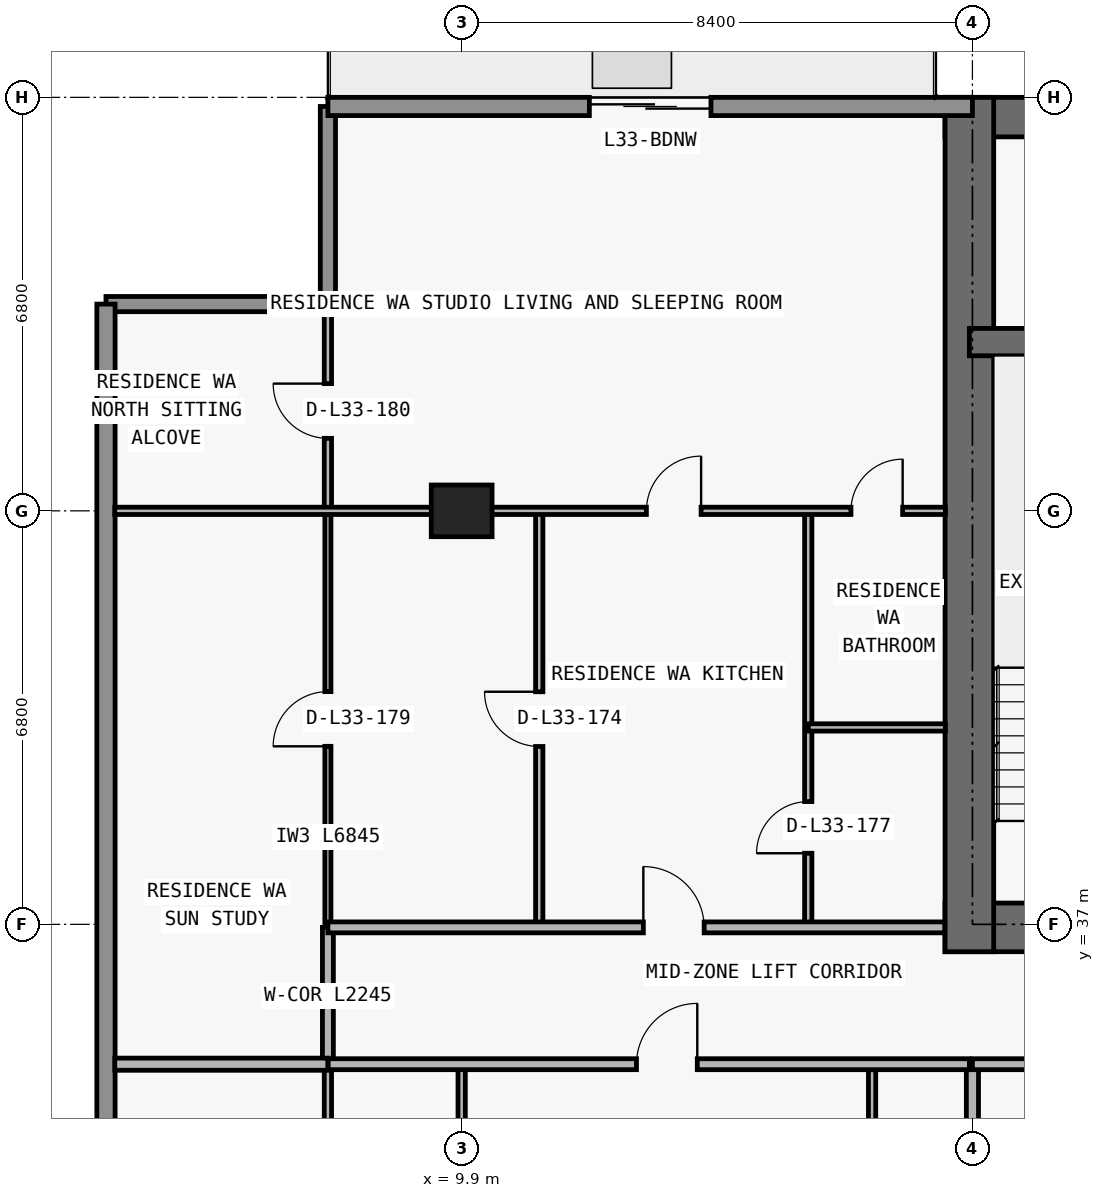
"""IFC4 building model, lengths in metres.
Left out: names, types, materials, properties, quantities, classifications, styles, units other than length and angle.
Written with IfcOpenShell. Run it as: python <this file> out.ifc"""

import sys

from ifc_helpers import new_model, si_unit, direction, frame, frame_2d, origin, origin_2d, place, context, subcontext, project, spatial, rectangle, extrude, element, fill, save


model = new_model("IFC4")
c1 = context("Model", 3, precision=1e-05, world=origin(), true_north=direction((0.0, 1.0)))
c2 = subcontext(c1, "Body", "Model", "MODEL_VIEW")
j1 = project(units=[si_unit("LENGTHUNIT", "METRE"), si_unit("PLANEANGLEUNIT", "RADIAN")], contexts=[c1])
p1 = place(None, origin())
s1 = spatial("IfcSite", under=j1, at=p1, CompositionType="ELEMENT")
p2 = place(p1, origin())
s2 = spatial("IfcBuilding", under=s1, at=p2, CompositionType="ELEMENT")
p3 = place(p2, frame((0.0, 0.0, 122.4)))
s3 = spatial("IfcBuildingStorey", under=s2, at=p3, CompositionType="ELEMENT", Elevation=122.4)
p4 = place(p3, frame((9.9, 43.8, 0.0), z_axis=(0.0, 0.0, 1.0), x_axis=(1.0, 0.0, 0.0)))
e1 = element("IfcColumn", 1, at=p4, inside=s3, PredefinedType="COLUMN", context=c2, shape_type="SweptSolid", body=[
    extrude(rectangle(XDim=1.0, YDim=0.85, at=origin_2d()), origin(), (0.0, 0.0, 1.0), 3.05),
])
p5 = place(p3, frame((17.85, 36.95, 0.0), z_axis=(0.0, 0.0, 1.0), x_axis=(1.0, 0.0, 0.0)))
e2 = element("IfcWall", 2, at=p5, inside=s3, PredefinedType="SHEAR", context=c2, shape_type="SweptSolid", body=[
    extrude(rectangle(XDim=42.1, YDim=0.8, at=frame_2d((21.05, 0.0))), origin(), (0.0, 0.0, 1.0), 3.05),
])
p6 = place(p5, frame((14.45, 0.0, 0.0)))
e3 = element("IfcOpeningElement", 3, at=p6, cuts=e2, PredefinedType="OPENING", context=c2, shape_type="SweptSolid", body=[
    extrude(rectangle(XDim=1.1, YDim=2.15, at=frame_2d((0.55, 1.075))), frame((0.0, 0.41, 0.0), z_axis=(0.0, -1.0, 0.0), x_axis=(1.0, 0.0, 0.0)), (0.0, 0.0, 1.0), 0.82),
])
p7 = place(p5, frame((6.3, 0.0, 0.0)))
e4 = element("IfcOpeningElement", 4, at=p7, cuts=e2, PredefinedType="OPENING", context=c2, shape_type="SweptSolid", body=[
    extrude(rectangle(XDim=1.05, YDim=2.15, at=frame_2d((0.525, 1.075))), frame((0.0, 0.41, 0.0), z_axis=(0.0, -1.0, 0.0), x_axis=(1.0, 0.0, 0.0)), (0.0, 0.0, 1.0), 0.82),
])
p8 = place(p5, frame((34.8, 0.0, 0.0)))
e5 = element("IfcOpeningElement", 5, at=p8, cuts=e2, PredefinedType="OPENING", context=c2, shape_type="SweptSolid", body=[
    extrude(rectangle(XDim=1.05, YDim=2.15, at=frame_2d((0.525, 1.075))), frame((0.0, 0.41, 0.0), z_axis=(0.0, -1.0, 0.0), x_axis=(1.0, 0.0, 0.0)), (0.0, 0.0, 1.0), 0.82),
])
p9 = place(p5, frame((10.913, 0.0, 0.0)))
e6 = element("IfcOpeningElement", 6, at=p9, cuts=e2, PredefinedType="OPENING", context=c2, shape_type="SweptSolid", body=[
    extrude(rectangle(XDim=1.05, YDim=2.15, at=frame_2d((0.525, 1.075))), frame((0.0, 0.41, 0.0), z_axis=(0.0, -1.0, 0.0), x_axis=(1.0, 0.0, 0.0)), (0.0, 0.0, 1.0), 0.82),
])
p10 = place(p5, frame((24.15, 0.0, 0.0)))
e7 = element("IfcOpeningElement", 7, at=p10, cuts=e2, PredefinedType="OPENING", context=c2, shape_type="SweptSolid", body=[
    extrude(rectangle(XDim=1.05, YDim=2.15, at=frame_2d((0.525, 1.075))), frame((0.0, 0.41, 0.0), z_axis=(0.0, -1.0, 0.0), x_axis=(1.0, 0.0, 0.0)), (0.0, 0.0, 1.0), 0.82),
])
p11 = place(p3, frame((17.85, 50.275, 0.0), z_axis=(0.0, 0.0, 1.0), x_axis=(1.0, 0.0, 0.0)))
e8 = element("IfcWall", 8, at=p11, inside=s3, PredefinedType="SHEAR", context=c2, shape_type="SweptSolid", body=[
    extrude(rectangle(XDim=42.1, YDim=0.65, at=frame_2d((21.05, 0.0))), origin(), (0.0, 0.0, 1.0), 3.05),
])
p12 = place(p3, frame((18.25, 36.55, 0.0), z_axis=(0.0, 0.0, 1.0), x_axis=(0.0, 1.0, 0.0)))
e9 = element("IfcWall", 9, at=p12, inside=s3, PredefinedType="SHEAR", context=c2, shape_type="SweptSolid", body=[
    extrude(rectangle(XDim=14.05, YDim=0.8, at=frame_2d((7.025, 0.0))), origin(), (0.0, 0.0, 1.0), 3.05),
])
p13 = place(p3, frame((18.25, 46.575, 0.0), z_axis=(0.0, 0.0, 1.0), x_axis=(1.0, 0.0, 0.0)))
e10 = element("IfcWall", 10, at=p13, inside=s3, PredefinedType="SHEAR", context=c2, shape_type="SweptSolid", body=[
    extrude(rectangle(XDim=41.3, YDim=0.45, at=frame_2d((20.65, 0.0))), origin(), (0.0, 0.0, 1.0), 3.05),
])
p14 = place(p13, frame((7.65, 0.0, 0.0)))
e11 = element("IfcOpeningElement", 11, at=p14, cuts=e10, PredefinedType="OPENING", context=c2, shape_type="SweptSolid", body=[
    extrude(rectangle(XDim=1.0, YDim=2.2, at=frame_2d((0.5, 1.1))), frame((0.0, 0.235, 0.0), z_axis=(0.0, -1.0, 0.0), x_axis=(1.0, 0.0, 0.0)), (0.0, 0.0, 1.0), 0.47),
])
p15 = place(p13, frame((32.675, 0.0, 0.0)))
e12 = element("IfcOpeningElement", 12, at=p15, cuts=e10, PredefinedType="OPENING", context=c2, shape_type="SweptSolid", body=[
    extrude(rectangle(XDim=1.05, YDim=2.15, at=frame_2d((0.525, 1.075))), frame((0.0, 0.235, 0.0), z_axis=(0.0, -1.0, 0.0), x_axis=(1.0, 0.0, 0.0)), (0.0, 0.0, 1.0), 0.47),
])
p16 = place(p3, frame((4.05, 47.2, 0.0), z_axis=(0.0, 0.0, 1.0), x_axis=(1.0, 0.0, 0.0)))
e13 = element("IfcWall", 13, at=p16, inside=s3, PredefinedType="ELEMENTEDWALL", context=c2, shape_type="SweptSolid", body=[
    extrude(rectangle(XDim=3.65, YDim=0.25, at=frame_2d((1.825, 0.0))), origin(), (0.0, 0.0, 1.0), 3.05),
])
p17 = place(p3, frame((7.7, 47.2, 0.0), z_axis=(0.0, 0.0, 1.0), x_axis=(0.0, 1.0, 0.0)))
e14 = element("IfcWall", 14, at=p17, inside=s3, PredefinedType="ELEMENTEDWALL", context=c2, shape_type="SweptSolid", body=[
    extrude(rectangle(XDim=3.25, YDim=0.25, at=frame_2d((1.625, 0.0))), origin(), (0.0, 0.0, 1.0), 3.05),
])
p18 = place(p3, frame((4.05, 28.0, 0.0), z_axis=(0.0, 0.0, 1.0), x_axis=(0.0, 1.0, 0.0)))
e15 = element("IfcWall", 15, at=p18, inside=s3, PredefinedType="STANDARD", context=c2, shape_type="SweptSolid", body=[
    extrude(rectangle(XDim=19.2, YDim=0.3, at=frame_2d((9.6, 0.0))), origin(), (0.0, 0.0, 1.0), 3.05),
])
p19 = place(p3, frame((7.7, 50.45, 0.0), z_axis=(0.0, 0.0, 1.0), x_axis=(1.0, 0.0, 0.0)))
e16 = element("IfcWall", 16, at=p19, inside=s3, PredefinedType="STANDARD", context=c2, shape_type="SweptSolid", body=[
    extrude(rectangle(XDim=10.6, YDim=0.3, at=frame_2d((5.3, 0.0))), origin(), (0.0, 0.0, 1.0), 3.05),
])
p20 = place(p19, frame((4.3, 0.0, 0.0)))
e17 = element("IfcOpeningElement", 17, at=p20, cuts=e16, PredefinedType="OPENING", context=c2, shape_type="SweptSolid", body=[
    extrude(rectangle(XDim=2.0, YDim=2.3, at=frame_2d((1.0, 1.15))), frame((0.0, 0.16, 0.0), z_axis=(0.0, -1.0, 0.0), x_axis=(1.0, 0.0, 0.0)), (0.0, 0.0, 1.0), 0.32),
])
p21 = place(p3, frame((7.7, 26.64, 0.0), z_axis=(0.0, 0.0, 1.0), x_axis=(0.0, 1.0, 0.0)))
e18 = element("IfcWall", 18, at=p21, inside=s3, PredefinedType="PARTITIONING", context=c2, shape_type="SweptSolid", body=[
    extrude(rectangle(XDim=8.06, YDim=0.12, at=frame_2d((4.03, 0.0))), origin(), (0.0, 0.0, 1.0), 3.05),
])
p22 = place(p3, frame((7.7, 34.705, 0.0), z_axis=(0.0, 0.0, 1.0), x_axis=(0.0, 1.0, 0.0)))
e19 = element("IfcWall", 19, at=p22, inside=s3, PredefinedType="PARTITIONING", context=c2, shape_type="SweptSolid", body=[
    extrude(rectangle(XDim=2.245, YDim=0.18, at=frame_2d((1.123, 0.0))), origin(), (0.0, 0.0, 1.0), 3.05),
])
p23 = place(p3, frame((7.7, 36.955, 0.0), z_axis=(0.0, 0.0, 1.0), x_axis=(0.0, 1.0, 0.0)))
e20 = element("IfcWall", 20, at=p23, inside=s3, PredefinedType="MOVABLE", context=c2, shape_type="SweptSolid", body=[
    extrude(rectangle(XDim=6.845, YDim=0.1, at=frame_2d((3.422, 0.0))), origin(), (0.0, 0.0, 1.0), 3.05),
])
p24 = place(p23, frame((2.972, 0.0, 0.0)))
e21 = element("IfcOpeningElement", 21, at=p24, cuts=e20, PredefinedType="OPENING", context=c2, shape_type="SweptSolid", body=[
    extrude(rectangle(XDim=0.9, YDim=2.15, at=frame_2d((0.45, 1.075))), frame((0.0, 0.06, 0.0), z_axis=(0.0, -1.0, 0.0), x_axis=(1.0, 0.0, 0.0)), (0.0, 0.0, 1.0), 0.12),
])
p25 = place(p3, frame((7.7, 43.805, 0.0), z_axis=(0.0, 0.0, 1.0), x_axis=(0.0, 1.0, 0.0)))
e22 = element("IfcWall", 22, at=p25, inside=s3, PredefinedType="PARTITIONING", context=c2, shape_type="SweptSolid", body=[
    extrude(rectangle(XDim=3.275, YDim=0.12, at=frame_2d((1.638, 0.0))), origin(), (0.0, 0.0, 1.0), 3.05),
])
p26 = place(p25, frame((1.188, 0.0, 0.0)))
e23 = element("IfcOpeningElement", 23, at=p26, cuts=e22, PredefinedType="OPENING", context=c2, shape_type="SweptSolid", body=[
    extrude(rectangle(XDim=0.9, YDim=2.15, at=frame_2d((0.45, 1.075))), frame((0.0, 0.07, 0.0), z_axis=(0.0, -1.0, 0.0), x_axis=(1.0, 0.0, 0.0)), (0.0, 0.0, 1.0), 0.14),
])
p27 = place(p3, frame((9.9, 26.64, 0.0), z_axis=(0.0, 0.0, 1.0), x_axis=(0.0, 1.0, 0.0)))
e24 = element("IfcWall", 24, at=p27, inside=s3, PredefinedType="PARTITIONING", context=c2, shape_type="SweptSolid", body=[
    extrude(rectangle(XDim=8.06, YDim=0.12, at=frame_2d((4.03, 0.0))), origin(), (0.0, 0.0, 1.0), 2.174),
])
p28 = place(p3, frame((11.176, 36.95, 0.0), z_axis=(0.0, 0.0, 1.0), x_axis=(0.0, 1.0, 0.0)))
e25 = element("IfcWall", 25, at=p28, inside=s3, PredefinedType="PARTITIONING", context=c2, shape_type="SweptSolid", body=[
    extrude(rectangle(XDim=6.85, YDim=0.12, at=frame_2d((3.425, 0.0))), origin(), (0.0, 0.0, 1.0), 3.05),
])
p29 = place(p28, frame((2.975, 0.0, 0.0)))
e26 = element("IfcOpeningElement", 26, at=p29, cuts=e25, PredefinedType="OPENING", context=c2, shape_type="SweptSolid", body=[
    extrude(rectangle(XDim=0.9, YDim=2.15, at=frame_2d((0.45, 1.075))), frame((0.0, 0.07, 0.0), z_axis=(0.0, -1.0, 0.0), x_axis=(1.0, 0.0, 0.0)), (0.0, 0.0, 1.0), 0.14),
])
p30 = place(p3, frame((15.6, 36.95, 0.0), z_axis=(0.0, 0.0, 1.0), x_axis=(0.0, 1.0, 0.0)))
e27 = element("IfcWall", 27, at=p30, inside=s3, PredefinedType="PARTITIONING", context=c2, shape_type="SweptSolid", body=[
    extrude(rectangle(XDim=6.85, YDim=0.12, at=frame_2d((3.425, 0.0))), origin(), (0.0, 0.0, 1.0), 3.05),
])
p31 = place(p30, frame((1.219, 0.0, 0.0)))
e28 = element("IfcOpeningElement", 28, at=p31, cuts=e27, PredefinedType="OPENING", context=c2, shape_type="SweptSolid", body=[
    extrude(rectangle(XDim=0.85, YDim=2.1, at=frame_2d((0.425, 1.05))), frame((0.0, 0.07, 0.0), z_axis=(0.0, -1.0, 0.0), x_axis=(1.0, 0.0, 0.0)), (0.0, 0.0, 1.0), 0.14),
])
p32 = place(p3, frame((16.65, 26.64, 0.0), z_axis=(0.0, 0.0, 1.0), x_axis=(0.0, 1.0, 0.0)))
e29 = element("IfcWall", 29, at=p32, inside=s3, PredefinedType="PARTITIONING", context=c2, shape_type="SweptSolid", body=[
    extrude(rectangle(XDim=8.06, YDim=0.12, at=frame_2d((4.03, 0.0))), origin(), (0.0, 0.0, 1.0), 3.05),
])
p33 = place(p32, frame((3.755, 0.0, 0.0)))
e30 = element("IfcOpeningElement", 30, at=p33, cuts=e29, PredefinedType="OPENING", context=c2, shape_type="SweptSolid", body=[
    extrude(rectangle(XDim=0.85, YDim=2.1, at=frame_2d((0.425, 1.05))), frame((0.0, 0.07, 0.0), z_axis=(0.0, -1.0, 0.0), x_axis=(1.0, 0.0, 0.0)), (0.0, 0.0, 1.0), 0.14),
])
p34 = place(p3, frame((18.3, 26.64, 0.0), z_axis=(0.0, 0.0, 1.0), x_axis=(0.0, 1.0, 0.0)))
e31 = element("IfcWall", 31, at=p34, inside=s3, PredefinedType="PARTITIONING", context=c2, shape_type="SweptSolid", body=[
    extrude(rectangle(XDim=8.06, YDim=0.2, at=frame_2d((4.03, 0.0))), origin(), (0.0, 0.0, 1.0), 2.174),
])
p35 = place(p3, frame((4.195, 34.7, 0.0), z_axis=(0.0, 0.0, 1.0), x_axis=(1.0, 0.0, 0.0)))
e32 = element("IfcWall", 32, at=p35, inside=s3, PredefinedType="PARTITIONING", context=c2, shape_type="SweptSolid", body=[
    extrude(rectangle(XDim=3.505, YDim=0.2, at=frame_2d((1.752, 0.0))), origin(), (0.0, 0.0, 1.0), 3.05),
])
p36 = place(p3, frame((7.705, 34.7, 0.0), z_axis=(0.0, 0.0, 1.0), x_axis=(1.0, 0.0, 0.0)))
e33 = element("IfcWall", 33, at=p36, inside=s3, PredefinedType="PARTITIONING", context=c2, shape_type="SweptSolid", body=[
    extrude(rectangle(XDim=10.545, YDim=0.18, at=frame_2d((5.272, 0.0))), origin(), (0.0, 0.0, 1.0), 3.05),
])
p37 = place(p36, frame((5.07, 0.0, 0.0)))
e34 = element("IfcOpeningElement", 34, at=p37, cuts=e33, PredefinedType="OPENING", context=c2, shape_type="SweptSolid", body=[
    extrude(rectangle(XDim=1.0, YDim=2.2, at=frame_2d((0.5, 1.1))), frame((0.0, 0.1, 0.0), z_axis=(0.0, -1.0, 0.0), x_axis=(1.0, 0.0, 0.0)), (0.0, 0.0, 1.0), 0.2),
])
p38 = place(p3, frame((18.3, 34.7, 0.0), z_axis=(0.0, 0.0, 1.0), x_axis=(1.0, 0.0, 0.0)))
e35 = element("IfcWall", 35, at=p38, inside=s3, PredefinedType="PARTITIONING", context=c2, shape_type="SweptSolid", body=[
    extrude(rectangle(XDim=41.2, YDim=0.18, at=frame_2d((20.6, 0.0))), origin(), (0.0, 0.0, 1.0), 3.05),
])
p39 = place(p38, frame((2.875, 0.0, 0.0)))
e36 = element("IfcOpeningElement", 36, at=p39, cuts=e35, PredefinedType="OPENING", context=c2, shape_type="SweptSolid", body=[
    extrude(rectangle(XDim=1.0, YDim=2.2, at=frame_2d((0.5, 1.1))), frame((0.0, 0.1, 0.0), z_axis=(0.0, -1.0, 0.0), x_axis=(1.0, 0.0, 0.0)), (0.0, 0.0, 1.0), 0.2),
])
p40 = place(p38, frame((11.275, 0.0, 0.0)))
e37 = element("IfcOpeningElement", 37, at=p40, cuts=e35, PredefinedType="OPENING", context=c2, shape_type="SweptSolid", body=[
    extrude(rectangle(XDim=1.0, YDim=2.2, at=frame_2d((0.5, 1.1))), frame((0.0, 0.1, 0.0), z_axis=(0.0, -1.0, 0.0), x_axis=(1.0, 0.0, 0.0)), (0.0, 0.0, 1.0), 0.2),
])
p41 = place(p38, frame((19.275, 0.0, 0.0)))
e38 = element("IfcOpeningElement", 38, at=p41, cuts=e35, PredefinedType="OPENING", context=c2, shape_type="SweptSolid", body=[
    extrude(rectangle(XDim=1.0, YDim=2.2, at=frame_2d((0.5, 1.1))), frame((0.0, 0.1, 0.0), z_axis=(0.0, -1.0, 0.0), x_axis=(1.0, 0.0, 0.0)), (0.0, 0.0, 1.0), 0.2),
])
p42 = place(p38, frame((27.275, 0.0, 0.0)))
e39 = element("IfcOpeningElement", 39, at=p42, cuts=e35, PredefinedType="OPENING", context=c2, shape_type="SweptSolid", body=[
    extrude(rectangle(XDim=1.0, YDim=2.2, at=frame_2d((0.5, 1.1))), frame((0.0, 0.1, 0.0), z_axis=(0.0, -1.0, 0.0), x_axis=(1.0, 0.0, 0.0)), (0.0, 0.0, 1.0), 0.2),
])
p43 = place(p38, frame((35.675, 0.0, 0.0)))
e40 = element("IfcOpeningElement", 40, at=p43, cuts=e35, PredefinedType="OPENING", context=c2, shape_type="SweptSolid", body=[
    extrude(rectangle(XDim=1.0, YDim=2.2, at=frame_2d((0.5, 1.1))), frame((0.0, 0.1, 0.0), z_axis=(0.0, -1.0, 0.0), x_axis=(1.0, 0.0, 0.0)), (0.0, 0.0, 1.0), 0.2),
])
p44 = place(p3, frame((7.7, 36.95, 0.0), z_axis=(0.0, 0.0, 1.0), x_axis=(1.0, 0.0, 0.0)))
e41 = element("IfcWall", 41, at=p44, inside=s3, PredefinedType="PARTITIONING", context=c2, shape_type="SweptSolid", body=[
    extrude(rectangle(XDim=10.145, YDim=0.18, at=frame_2d((5.073, 0.0))), origin(), (0.0, 0.0, 1.0), 3.05),
])
p45 = place(p44, frame((5.188, 0.0, 0.0)))
e42 = element("IfcOpeningElement", 42, at=p45, cuts=e41, PredefinedType="OPENING", context=c2, shape_type="SweptSolid", body=[
    extrude(rectangle(XDim=1.0, YDim=2.2, at=frame_2d((0.5, 1.1))), frame((0.0, 0.1, 0.0), z_axis=(0.0, -1.0, 0.0), x_axis=(1.0, 0.0, 0.0)), (0.0, 0.0, 1.0), 0.2),
])
p46 = place(p3, frame((15.6, 40.238, 0.0), z_axis=(0.0, 0.0, 1.0), x_axis=(1.0, 0.0, 0.0)))
e43 = element("IfcWall", 43, at=p46, inside=s3, PredefinedType="PARTITIONING", context=c2, shape_type="SweptSolid", body=[
    extrude(rectangle(XDim=2.255, YDim=0.12, at=frame_2d((1.127, 0.0))), origin(), (0.0, 0.0, 1.0), 3.05),
])
p47 = place(p3, frame((4.195, 43.8, 0.0), z_axis=(0.0, 0.0, 1.0), x_axis=(1.0, 0.0, 0.0)))
e44 = element("IfcWall", 44, at=p47, inside=s3, PredefinedType="PARTITIONING", context=c2, shape_type="SweptSolid", body=[
    extrude(rectangle(XDim=13.66, YDim=0.12, at=frame_2d((6.83, 0.0))), origin(), (0.0, 0.0, 1.0), 2.339),
])
p48 = place(p47, frame((8.743, 0.0, 0.0)))
e45 = element("IfcOpeningElement", 45, at=p48, cuts=e44, PredefinedType="OPENING", context=c2, shape_type="SweptSolid", body=[
    extrude(rectangle(XDim=0.9, YDim=2.15, at=frame_2d((0.45, 1.075))), frame((0.0, 0.07, 0.0), z_axis=(0.0, -1.0, 0.0), x_axis=(1.0, 0.0, 0.0)), (0.0, 0.0, 1.0), 0.14),
])
p49 = place(p47, frame((12.107, 0.0, 0.0)))
e46 = element("IfcOpeningElement", 46, at=p49, cuts=e44, PredefinedType="OPENING", context=c2, shape_type="SweptSolid", body=[
    extrude(rectangle(XDim=0.85, YDim=2.1, at=frame_2d((0.425, 1.05))), frame((0.0, 0.07, 0.0), z_axis=(0.0, -1.0, 0.0), x_axis=(1.0, 0.0, 0.0)), (0.0, 0.0, 1.0), 0.14),
])
p50 = place(p20, origin())
e47 = element("IfcDoor", 47, at=p50, inside=s3, OperationType="DOUBLE_DOOR_SLIDING", PredefinedType="DOOR", context=c2, shape_type="SweptSolid", body=[
    extrude(rectangle(XDim=2.0, YDim=2.3, at=frame_2d((1.0, 1.15))), frame((0.0, 0.025, 0.0), z_axis=(0.0, -1.0, 0.0), x_axis=(1.0, 0.0, 0.0)), (0.0, 0.0, 1.0), 0.05),
])
fill(e17, e47)
p51 = place(p37, origin())
e48 = element("IfcDoor", 48, at=p51, inside=s3, OperationType="SINGLE_SWING_RIGHT", PredefinedType="DOOR", context=c2, shape_type="SweptSolid", body=[
    extrude(rectangle(XDim=1.0, YDim=2.2, at=frame_2d((0.5, 1.1))), frame((0.0, 0.025, 0.0), z_axis=(0.0, -1.0, 0.0), x_axis=(1.0, 0.0, 0.0)), (0.0, 0.0, 1.0), 0.05),
])
fill(e34, e48)
p52 = place(p29, origin())
e49 = element("IfcDoor", 49, at=p52, inside=s3, OperationType="SINGLE_SWING_RIGHT", PredefinedType="DOOR", context=c2, shape_type="SweptSolid", body=[
    extrude(rectangle(XDim=0.9, YDim=2.15, at=frame_2d((0.45, 1.075))), frame((0.0, 0.025, 0.0), z_axis=(0.0, -1.0, 0.0), x_axis=(1.0, 0.0, 0.0)), (0.0, 0.0, 1.0), 0.05),
])
fill(e26, e49)
p53 = place(p45, origin())
e50 = element("IfcDoor", 50, at=p53, inside=s3, OperationType="SINGLE_SWING_LEFT", PredefinedType="DOOR", context=c2, shape_type="SweptSolid", body=[
    extrude(rectangle(XDim=1.0, YDim=2.2, at=frame_2d((0.5, 1.1))), frame((0.0, 0.025, 0.0), z_axis=(0.0, -1.0, 0.0), x_axis=(1.0, 0.0, 0.0)), (0.0, 0.0, 1.0), 0.05),
])
fill(e42, e50)
p54 = place(p48, origin())
e51 = element("IfcDoor", 51, at=p54, inside=s3, OperationType="SINGLE_SWING_RIGHT", PredefinedType="DOOR", context=c2, shape_type="SweptSolid", body=[
    extrude(rectangle(XDim=0.9, YDim=2.15, at=frame_2d((0.45, 1.075))), frame((0.0, 0.025, 0.0), z_axis=(0.0, -1.0, 0.0), x_axis=(1.0, 0.0, 0.0)), (0.0, 0.0, 1.0), 0.05),
])
fill(e45, e51)
p55 = place(p31, origin())
e52 = element("IfcDoor", 52, at=p55, inside=s3, OperationType="SINGLE_SWING_LEFT", PredefinedType="DOOR", context=c2, shape_type="SweptSolid", body=[
    extrude(rectangle(XDim=0.85, YDim=2.1, at=frame_2d((0.425, 1.05))), frame((0.0, 0.025, 0.0), z_axis=(0.0, -1.0, 0.0), x_axis=(1.0, 0.0, 0.0)), (0.0, 0.0, 1.0), 0.05),
])
fill(e28, e52)
p56 = place(p49, origin())
e53 = element("IfcDoor", 53, at=p56, inside=s3, OperationType="SINGLE_SWING_RIGHT", PredefinedType="DOOR", context=c2, shape_type="SweptSolid", body=[
    extrude(rectangle(XDim=0.85, YDim=2.1, at=frame_2d((0.425, 1.05))), frame((0.0, 0.025, 0.0), z_axis=(0.0, -1.0, 0.0), x_axis=(1.0, 0.0, 0.0)), (0.0, 0.0, 1.0), 0.05),
])
fill(e46, e53)
p57 = place(p24, origin())
e54 = element("IfcDoor", 54, at=p57, inside=s3, OperationType="SINGLE_SWING_LEFT", PredefinedType="DOOR", context=c2, shape_type="SweptSolid", body=[
    extrude(rectangle(XDim=0.9, YDim=2.15, at=frame_2d((0.45, 1.075))), frame((0.0, 0.025, 0.0), z_axis=(0.0, -1.0, 0.0), x_axis=(1.0, 0.0, 0.0)), (0.0, 0.0, 1.0), 0.05),
])
fill(e21, e54)
p58 = place(p26, origin())
e55 = element("IfcDoor", 55, at=p58, inside=s3, OperationType="SINGLE_SWING_RIGHT", PredefinedType="DOOR", context=c2, shape_type="SweptSolid", body=[
    extrude(rectangle(XDim=0.9, YDim=2.15, at=frame_2d((0.45, 1.075))), frame((0.0, 0.025, 0.0), z_axis=(0.0, -1.0, 0.0), x_axis=(1.0, 0.0, 0.0)), (0.0, 0.0, 1.0), 0.05),
])
fill(e23, e55)
save(model, sys.argv[1])
